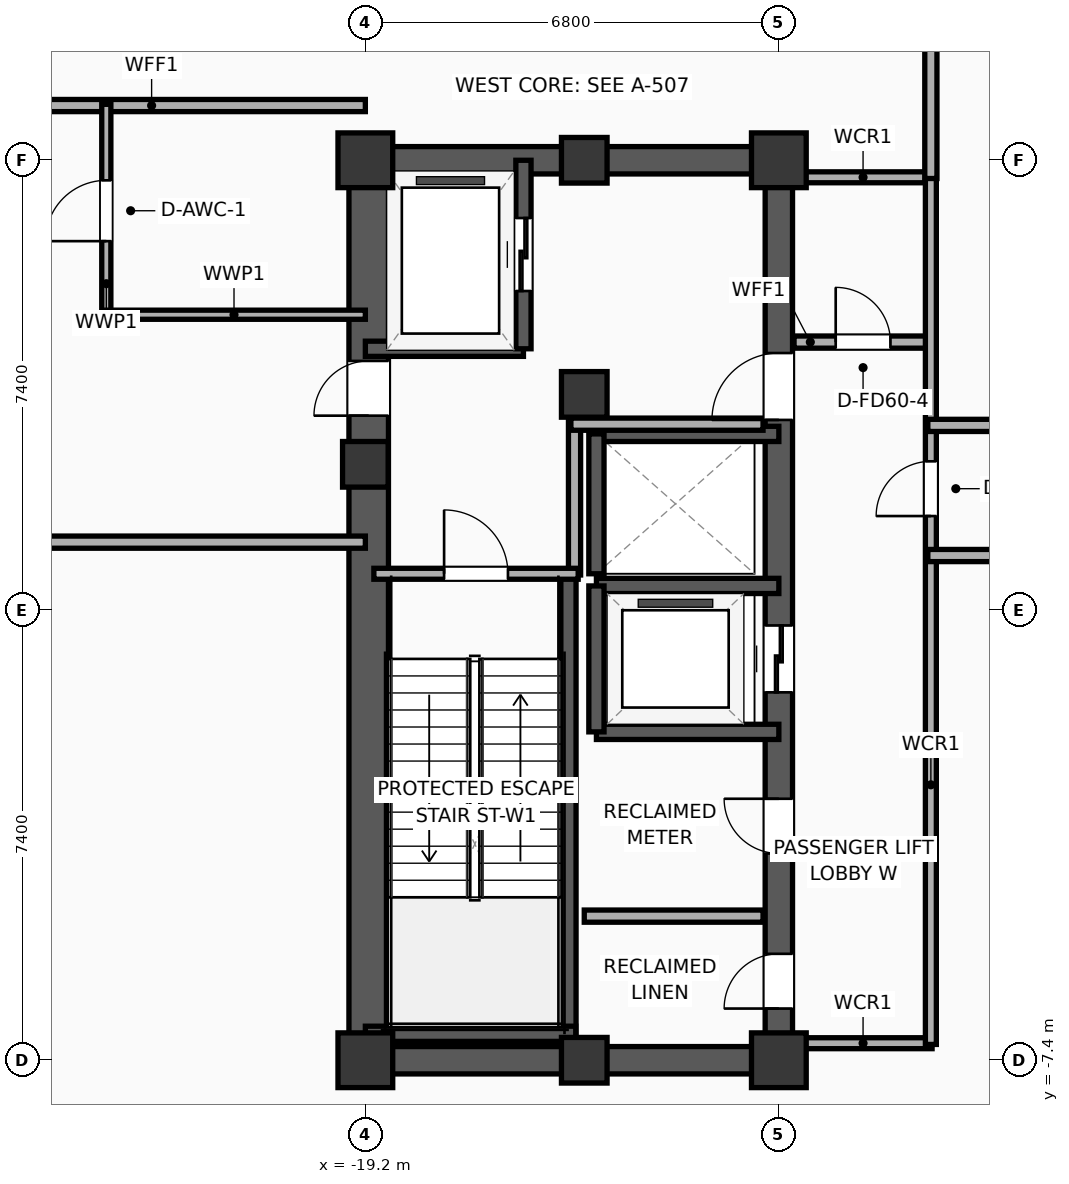
"""IFC4 building model, lengths in metres.
Left out: names, types, materials, properties, quantities, classifications, styles, units other than length and angle.
Written with IfcOpenShell. Run it as: python <this file> out.ifc"""

import sys

from ifc_helpers import new_model, si_unit, direction, frame, frame_2d, origin, origin_2d, place, context, subcontext, project, spatial, rectangle, extrude, element, fill, save


model = new_model("IFC4")
c1 = context("Model", 3, precision=1e-05, world=origin(), true_north=direction((0.0, 1.0)))
c2 = subcontext(c1, "Body", "Model", "MODEL_VIEW")
j1 = project(units=[si_unit("LENGTHUNIT", "METRE"), si_unit("PLANEANGLEUNIT", "RADIAN")], contexts=[c1])
p1 = place(None, origin())
s1 = spatial("IfcSite", under=j1, at=p1, CompositionType="ELEMENT")
p2 = place(p1, origin())
s2 = spatial("IfcBuilding", under=s1, at=p2, CompositionType="ELEMENT")
p3 = place(p2, frame((0.0, 0.0, 195.0)))
s3 = spatial("IfcBuildingStorey", under=s2, at=p3, CompositionType="ELEMENT", Elevation=195.0)
p4 = place(p3, frame((-19.2, -7.4, 0.0), z_axis=(0.0, 0.0, 1.0), x_axis=(1.0, 0.0, 0.0)))
e1 = element("IfcColumn", 1, at=p4, inside=s3, PredefinedType="COLUMN", context=c2, shape_type="SweptSolid", body=[
    extrude(rectangle(XDim=0.9, YDim=0.9, at=origin_2d()), origin(), (0.0, 0.0, 1.0), 5.2),
])
p5 = place(p3, frame((-19.2, 2.4, 0.0), z_axis=(0.0, 0.0, 1.0), x_axis=(1.0, 0.0, 0.0)))
e2 = element("IfcColumn", 2, at=p5, inside=s3, PredefinedType="COLUMN", context=c2, shape_type="SweptSolid", body=[
    extrude(rectangle(XDim=0.75, YDim=0.75, at=origin_2d()), origin(), (0.0, 0.0, 1.0), 5.2),
])
p6 = place(p3, frame((-19.2, 7.4, 0.0), z_axis=(0.0, 0.0, 1.0), x_axis=(1.0, 0.0, 0.0)))
e3 = element("IfcColumn", 3, at=p6, inside=s3, PredefinedType="COLUMN", context=c2, shape_type="SweptSolid", body=[
    extrude(rectangle(XDim=0.9, YDim=0.9, at=origin_2d()), origin(), (0.0, 0.0, 1.0), 5.2),
])
for number, where, z_axis, x_axis in (
    (4, (-15.6, -7.4, 0.0), (0.0, 0.0, 1.0), (1.0, 0.0, 0.0)),
    (5, (-15.6, 7.4, 0.0), (0.0, 0.0, 1.0), (1.0, 0.0, 0.0)),
):
    element("IfcColumn", number, at=place(p3, frame(where, z_axis=z_axis, x_axis=x_axis)), inside=s3, PredefinedType="COLUMN", context=c2, shape_type="SweptSolid", body=[
        extrude(rectangle(XDim=0.75, YDim=0.75, at=origin_2d()), origin(), (0.0, 0.0, 1.0), 5.2),
    ])
p7 = place(p3, frame((-12.4, -7.4, 0.0), z_axis=(0.0, 0.0, 1.0), x_axis=(1.0, 0.0, 0.0)))
e6 = element("IfcColumn", 6, at=p7, inside=s3, PredefinedType="COLUMN", context=c2, shape_type="SweptSolid", body=[
    extrude(rectangle(XDim=0.9, YDim=0.9, at=origin_2d()), origin(), (0.0, 0.0, 1.0), 5.2),
])
p8 = place(p3, frame((-15.6, 3.55, 0.0), z_axis=(0.0, 0.0, 1.0), x_axis=(1.0, 0.0, 0.0)))
e7 = element("IfcColumn", 7, at=p8, inside=s3, PredefinedType="COLUMN", context=c2, shape_type="SweptSolid", body=[
    extrude(rectangle(XDim=0.75, YDim=0.75, at=origin_2d()), origin(), (0.0, 0.0, 1.0), 5.2),
])
p9 = place(p3, frame((-12.4, 7.4, 0.0), z_axis=(0.0, 0.0, 1.0), x_axis=(1.0, 0.0, 0.0)))
e8 = element("IfcColumn", 8, at=p9, inside=s3, PredefinedType="COLUMN", context=c2, shape_type="SweptSolid", body=[
    extrude(rectangle(XDim=0.9, YDim=0.9, at=origin_2d()), origin(), (0.0, 0.0, 1.0), 5.2),
])
for number, where, z_axis, x_axis in (
    (9, (-19.425, -7.4, 0.0), (0.0, 0.0, 1.0), (1.0, 0.0, 0.0)),
    (10, (-19.425, 7.4, 0.0), (0.0, 0.0, 1.0), (1.0, 0.0, 0.0)),
):
    element("IfcWall", number, at=place(p3, frame(where, z_axis=z_axis, x_axis=x_axis)), inside=s3, PredefinedType="SHEAR", context=c2, shape_type="SweptSolid", body=[
        extrude(rectangle(XDim=7.25, YDim=0.45, at=frame_2d((3.625, 0.0))), origin(), (0.0, 0.0, 1.0), 4.8),
    ])
p10 = place(p3, frame((-19.145, -7.4, 0.0), z_axis=(0.0, 0.0, 1.0), x_axis=(0.0, 1.0, 0.0)))
e11 = element("IfcWall", 11, at=p10, inside=s3, PredefinedType="SHEAR", context=c2, shape_type="SweptSolid", body=[
    extrude(rectangle(XDim=14.8, YDim=0.65, at=frame_2d((7.4, 0.0))), origin(), (0.0, 0.0, 1.0), 4.8),
])
p11 = place(p10, frame((10.6, 0.0, 0.0)))
e12 = element("IfcOpeningElement", 12, at=p11, cuts=e11, PredefinedType="OPENING", context=c2, shape_type="SweptSolid", body=[
    extrude(rectangle(XDim=0.9, YDim=2.05, at=frame_2d((0.45, 1.025))), frame((0.0, 0.335, 0.0), z_axis=(0.0, -1.0, 0.0), x_axis=(1.0, 0.0, 0.0)), (0.0, 0.0, 1.0), 0.67),
])
p12 = place(p3, frame((-12.4, -7.4, 0.0), z_axis=(0.0, 0.0, 1.0), x_axis=(0.0, 1.0, 0.0)))
e13 = element("IfcWall", 13, at=p12, inside=s3, PredefinedType="SHEAR", context=c2, shape_type="SweptSolid", body=[
    extrude(rectangle(XDim=14.8, YDim=0.45, at=frame_2d((7.4, 0.0))), origin(), (0.0, 0.0, 1.0), 4.8),
])
p13 = place(p12, frame((6.05, 0.0, 0.0)))
e14 = element("IfcOpeningElement", 14, at=p13, cuts=e13, PredefinedType="OPENING", context=c2, shape_type="SweptSolid", body=[
    extrude(rectangle(XDim=1.1, YDim=2.05, at=frame_2d((0.55, 1.025))), frame((0.0, 0.235, 0.0), z_axis=(0.0, -1.0, 0.0), x_axis=(1.0, 0.0, 0.0)), (0.0, 0.0, 1.0), 0.47),
])
p14 = place(p12, frame((10.53, 0.0, 0.0)))
e15 = element("IfcOpeningElement", 15, at=p14, cuts=e13, PredefinedType="OPENING", context=c2, shape_type="SweptSolid", body=[
    extrude(rectangle(XDim=1.1, YDim=2.05, at=frame_2d((0.55, 1.025))), frame((0.0, 0.235, 0.0), z_axis=(0.0, -1.0, 0.0), x_axis=(1.0, 0.0, 0.0)), (0.0, 0.0, 1.0), 0.47),
])
p15 = place(p12, frame((0.85, 0.0, 0.0)))
e16 = element("IfcOpeningElement", 16, at=p15, cuts=e13, PredefinedType="OPENING", context=c2, shape_type="SweptSolid", body=[
    extrude(rectangle(XDim=0.9, YDim=2.05, at=frame_2d((0.45, 1.025))), frame((0.0, 0.235, 0.0), z_axis=(0.0, -1.0, 0.0), x_axis=(1.0, 0.0, 0.0)), (0.0, 0.0, 1.0), 0.47),
])
p16 = place(p12, frame((3.4, 0.0, 0.0)))
e17 = element("IfcOpeningElement", 17, at=p16, cuts=e13, PredefinedType="OPENING", context=c2, shape_type="SweptSolid", body=[
    extrude(rectangle(XDim=0.9, YDim=2.05, at=frame_2d((0.45, 1.025))), frame((0.0, 0.235, 0.0), z_axis=(0.0, -1.0, 0.0), x_axis=(1.0, 0.0, 0.0)), (0.0, 0.0, 1.0), 0.47),
])
p17 = place(p3, frame((-15.86, -7.085, 0.0), z_axis=(0.0, 0.0, 1.0), x_axis=(0.0, 1.0, 0.0)))
e18 = element("IfcWall", 18, at=p17, inside=s3, PredefinedType="SOLIDWALL", context=c2, shape_type="SweptSolid", body=[
    extrude(rectangle(XDim=7.685, YDim=0.25, at=frame_2d((3.843, 0.0))), origin(), (0.0, 0.0, 1.0), 4.8),
])
p18 = place(p3, frame((-19.2, -6.965, 0.0), z_axis=(0.0, 0.0, 1.0), x_axis=(1.0, 0.0, 0.0)))
e19 = element("IfcWall", 19, at=p18, inside=s3, PredefinedType="SOLIDWALL", context=c2, shape_type="SweptSolid", body=[
    extrude(rectangle(XDim=3.46, YDim=0.25, at=frame_2d((1.73, 0.0))), origin(), (0.0, 0.0, 1.0), 4.8),
])
p19 = place(p3, frame((-19.2, 4.3, 0.0), z_axis=(0.0, 0.0, 1.0), x_axis=(1.0, 0.0, 0.0)))
e20 = element("IfcWall", 20, at=p19, inside=s3, PredefinedType="SOLIDWALL", context=c2, shape_type="SweptSolid", body=[
    extrude(rectangle(XDim=2.6, YDim=0.25, at=frame_2d((1.3, 0.0))), origin(), (0.0, 0.0, 1.0), 4.8),
])
p20 = place(p3, frame((-16.6, 4.3, 0.0), z_axis=(0.0, 0.0, 1.0), x_axis=(0.0, 1.0, 0.0)))
e21 = element("IfcWall", 21, at=p20, inside=s3, PredefinedType="SOLIDWALL", context=c2, shape_type="SweptSolid", body=[
    extrude(rectangle(XDim=3.1, YDim=0.25, at=frame_2d((1.55, 0.0))), origin(), (0.0, 0.0, 1.0), 4.8),
])
p21 = place(p20, frame((0.95, 0.0, 0.0)))
e22 = element("IfcOpeningElement", 22, at=p21, cuts=e21, PredefinedType="OPENING", context=c2, shape_type="SweptSolid", body=[
    extrude(rectangle(XDim=1.2, YDim=2.05, at=frame_2d((0.6, 1.025))), frame((0.0, 0.135, 0.0), z_axis=(0.0, -1.0, 0.0), x_axis=(1.0, 0.0, 0.0)), (0.0, 0.0, 1.0), 0.27),
])
for number, where, z_axis, x_axis in (
    (23, (-15.4, -2.0, 0.0), (0.0, 0.0, 1.0), (1.0, 0.0, 0.0)),
    (24, (-12.4, 0.4, 0.0), (0.0, 0.0, 1.0), (-1.0, 0.0, 0.0)),
):
    element("IfcWall", number, at=place(p3, frame(where, z_axis=z_axis, x_axis=x_axis)), inside=s3, PredefinedType="SOLIDWALL", context=c2, shape_type="SweptSolid", body=[
        extrude(rectangle(XDim=3.0, YDim=0.25, at=frame_2d((1.5, 0.0))), origin(), (0.0, 0.0, 1.0), 4.8),
    ])
p22 = place(p3, frame((-15.4, 0.4, 0.0), z_axis=(0.0, 0.0, 1.0), x_axis=(0.0, -1.0, 0.0)))
e25 = element("IfcWall", 25, at=p22, inside=s3, PredefinedType="SOLIDWALL", context=c2, shape_type="SweptSolid", body=[
    extrude(rectangle(XDim=2.4, YDim=0.25, at=frame_2d((1.2, 0.0))), origin(), (0.0, 0.0, 1.0), 4.8),
])
p23 = place(p3, frame((-12.4, 2.9, 0.0), z_axis=(0.0, 0.0, 1.0), x_axis=(-1.0, 0.0, 0.0)))
e26 = element("IfcWall", 26, at=p23, inside=s3, PredefinedType="SOLIDWALL", context=c2, shape_type="SweptSolid", body=[
    extrude(rectangle(XDim=3.0, YDim=0.25, at=frame_2d((1.5, 0.0))), origin(), (0.0, 0.0, 1.0), 4.8),
])
p24 = place(p3, frame((-15.4, 2.9, 0.0), z_axis=(0.0, 0.0, 1.0), x_axis=(0.0, -1.0, 0.0)))
e27 = element("IfcWall", 27, at=p24, inside=s3, PredefinedType="SOLIDWALL", context=c2, shape_type="SweptSolid", body=[
    extrude(rectangle(XDim=2.3, YDim=0.25, at=frame_2d((1.15, 0.0))), origin(), (0.0, 0.0, 1.0), 4.8),
])
p25 = place(p3, frame((-15.76, 0.58, 0.0), z_axis=(0.0, 0.0, 1.0), x_axis=(0.0, 1.0, 0.0)))
e28 = element("IfcWall", 28, at=p25, inside=s3, PredefinedType="PARTITIONING", context=c2, shape_type="SweptSolid", body=[
    extrude(rectangle(XDim=2.52, YDim=0.2, at=frame_2d((1.26, 0.0))), origin(), (0.0, 0.0, 1.0), 4.8),
])
p26 = place(p3, frame((-15.82, 3.06, 0.0), z_axis=(0.0, 0.0, 1.0), x_axis=(1.0, 0.0, 0.0)))
e29 = element("IfcWall", 29, at=p26, inside=s3, PredefinedType="PARTITIONING", context=c2, shape_type="SweptSolid", body=[
    extrude(rectangle(XDim=3.16, YDim=0.2, at=frame_2d((1.58, 0.0))), origin(), (0.0, 0.0, 1.0), 4.8),
])
p27 = place(p3, frame((-19.06, 0.6, 0.0), z_axis=(0.0, 0.0, 1.0), x_axis=(1.0, 0.0, 0.0)))
e30 = element("IfcWall", 30, at=p27, inside=s3, PredefinedType="PARTITIONING", context=c2, shape_type="SweptSolid", body=[
    extrude(rectangle(XDim=3.36, YDim=0.18, at=frame_2d((1.68, 0.0))), origin(), (0.0, 0.0, 1.0), 4.8),
])
p28 = place(p27, frame((1.155, 0.0, 0.0)))
e31 = element("IfcOpeningElement", 31, at=p28, cuts=e30, PredefinedType="OPENING", context=c2, shape_type="SweptSolid", body=[
    extrude(rectangle(XDim=1.05, YDim=2.05, at=frame_2d((0.525, 1.025))), frame((0.0, 0.1, 0.0), z_axis=(0.0, -1.0, 0.0), x_axis=(1.0, 0.0, 0.0)), (0.0, 0.0, 1.0), 0.2),
])
p29 = place(p3, frame((-15.6, -5.03, 0.0), z_axis=(0.0, 0.0, 1.0), x_axis=(1.0, 0.0, 0.0)))
e32 = element("IfcWall", 32, at=p29, inside=s3, PredefinedType="PARTITIONING", context=c2, shape_type="SweptSolid", body=[
    extrude(rectangle(XDim=2.94, YDim=0.2, at=frame_2d((1.47, 0.0))), origin(), (0.0, 0.0, 1.0), 4.8),
])
p30 = place(p3, frame((-12.15, 4.41, 0.0), z_axis=(0.0, 0.0, 1.0), x_axis=(1.0, 0.0, 0.0)))
e33 = element("IfcWall", 33, at=p30, inside=s3, PredefinedType="PARTITIONING", context=c2, shape_type="SweptSolid", body=[
    extrude(rectangle(XDim=2.27, YDim=0.2, at=frame_2d((1.135, 0.0))), origin(), (0.0, 0.0, 1.0), 4.8),
])
p31 = place(p30, frame((0.685, 0.0, 0.0)))
e34 = element("IfcOpeningElement", 34, at=p31, cuts=e33, PredefinedType="OPENING", context=c2, shape_type="SweptSolid", body=[
    extrude(rectangle(XDim=0.9, YDim=2.05, at=frame_2d((0.45, 1.025))), frame((0.0, 0.11, 0.0), z_axis=(0.0, -1.0, 0.0), x_axis=(1.0, 0.0, 0.0)), (0.0, 0.0, 1.0), 0.22),
])
for number, where, z_axis, x_axis in (
    (35, (-12.15, 7.12, 0.0), (0.0, 0.0, 1.0), (1.0, 0.0, 0.0)),
    (36, (-12.15, -7.12, 0.0), (0.0, 0.0, 1.0), (1.0, 0.0, 0.0)),
):
    element("IfcWall", number, at=place(p3, frame(where, z_axis=z_axis, x_axis=x_axis)), inside=s3, PredefinedType="PARTITIONING", context=c2, shape_type="SweptSolid", body=[
        extrude(rectangle(XDim=2.27, YDim=0.18, at=frame_2d((1.135, 0.0))), origin(), (0.0, 0.0, 1.0), 3.84),
    ])
p32 = place(p3, frame((-9.9, -7.14, 0.0), z_axis=(0.0, 0.0, 1.0), x_axis=(0.0, 1.0, 0.0)))
e37 = element("IfcWall", 37, at=p32, inside=s3, PredefinedType="PARTITIONING", context=c2, shape_type="SweptSolid", body=[
    extrude(rectangle(XDim=14.28, YDim=0.18, at=frame_2d((7.14, 0.0))), origin(), (0.0, 0.0, 1.0), 4.8),
])
p33 = place(p32, frame((8.689, 0.0, 0.0)))
e38 = element("IfcOpeningElement", 38, at=p33, cuts=e37, PredefinedType="OPENING", context=c2, shape_type="SweptSolid", body=[
    extrude(rectangle(XDim=0.9, YDim=2.05, at=frame_2d((0.45, 1.025))), frame((0.0, 0.1, 0.0), z_axis=(0.0, -1.0, 0.0), x_axis=(1.0, 0.0, 0.0)), (0.0, 0.0, 1.0), 0.2),
])
p34 = place(p3, frame((-9.95, 3.04, 0.0), z_axis=(0.0, 0.0, 1.0), x_axis=(1.0, 0.0, 0.0)))
e39 = element("IfcWall", 39, at=p34, inside=s3, PredefinedType="PARTITIONING", context=c2, shape_type="SweptSolid", body=[
    extrude(rectangle(XDim=19.9, YDim=0.2, at=frame_2d((9.95, 0.0))), origin(), (0.0, 0.0, 1.0), 4.8),
])
p35 = place(p34, frame((9.425, 0.0, 0.0)))
e40 = element("IfcOpeningElement", 40, at=p35, cuts=e39, PredefinedType="OPENING", context=c2, shape_type="SweptSolid", body=[
    extrude(rectangle(XDim=1.05, YDim=2.05, at=frame_2d((0.525, 1.025))), frame((0.0, 0.11, 0.0), z_axis=(0.0, -1.0, 0.0), x_axis=(1.0, 0.0, 0.0)), (0.0, 0.0, 1.0), 0.22),
])
p36 = place(p3, frame((-9.95, 0.9, 0.0), z_axis=(0.0, 0.0, 1.0), x_axis=(1.0, 0.0, 0.0)))
e41 = element("IfcWall", 41, at=p36, inside=s3, PredefinedType="PARTITIONING", context=c2, shape_type="SweptSolid", body=[
    extrude(rectangle(XDim=19.9, YDim=0.2, at=frame_2d((9.95, 0.0))), origin(), (0.0, 0.0, 1.0), 4.8),
])
p37 = place(p36, frame((9.425, 0.0, 0.0)))
e42 = element("IfcOpeningElement", 42, at=p37, cuts=e41, PredefinedType="OPENING", context=c2, shape_type="SweptSolid", body=[
    extrude(rectangle(XDim=1.05, YDim=2.05, at=frame_2d((0.525, 1.025))), frame((0.0, 0.11, 0.0), z_axis=(0.0, -1.0, 0.0), x_axis=(1.0, 0.0, 0.0)), (0.0, 0.0, 1.0), 0.22),
])
for number, where, z_axis, x_axis in (
    (43, (-26.23, 1.12, 0.0), (0.0, 0.0, 1.0), (1.0, 0.0, 0.0)),
    (44, (-26.23, 8.3, 0.0), (0.0, 0.0, 1.0), (1.0, 0.0, 0.0)),
):
    element("IfcWall", number, at=place(p3, frame(where, z_axis=z_axis, x_axis=x_axis)), inside=s3, PredefinedType="PARTITIONING", context=c2, shape_type="SweptSolid", body=[
        extrude(rectangle(XDim=7.03, YDim=0.2, at=frame_2d((3.515, 0.0))), origin(), (0.0, 0.0, 1.0), 4.8),
    ])
p38 = place(p3, frame((-23.46, 4.82, 0.0), z_axis=(0.0, 0.0, 1.0), x_axis=(0.0, 1.0, 0.0)))
e45 = element("IfcWall", 45, at=p38, inside=s3, PredefinedType="PLUMBINGWALL", context=c2, shape_type="SweptSolid", body=[
    extrude(rectangle(XDim=3.5, YDim=0.15, at=frame_2d((1.75, 0.0))), origin(), (0.0, 0.0, 1.0), 4.8),
])
p39 = place(p38, frame((1.25, 0.0, 0.0)))
e46 = element("IfcOpeningElement", 46, at=p39, cuts=e45, PredefinedType="OPENING", context=c2, shape_type="SweptSolid", body=[
    extrude(rectangle(XDim=1.0, YDim=2.05, at=frame_2d((0.5, 1.025))), frame((0.0, 0.085, 0.0), z_axis=(0.0, -1.0, 0.0), x_axis=(1.0, 0.0, 0.0)), (0.0, 0.0, 1.0), 0.17),
])
p40 = place(p3, frame((-23.52, 4.86, 0.0), z_axis=(0.0, 0.0, 1.0), x_axis=(1.0, 0.0, 0.0)))
e47 = element("IfcWall", 47, at=p40, inside=s3, PredefinedType="PLUMBINGWALL", context=c2, shape_type="SweptSolid", body=[
    extrude(rectangle(XDim=4.32, YDim=0.15, at=frame_2d((2.16, 0.0))), origin(), (0.0, 0.0, 1.0), 4.8),
])
p41 = place(p3, frame((-9.9, 7.1, 0.0), z_axis=(0.0, 0.0, 1.0), x_axis=(0.0, 1.0, 0.0)))
e48 = element("IfcWall", 48, at=p41, inside=s3, PredefinedType="PARTITIONING", context=c2, shape_type="SweptSolid", body=[
    extrude(rectangle(XDim=12.93, YDim=0.2, at=frame_2d((6.465, 0.0))), origin(), (0.0, 0.0, 1.0), 4.8),
])
p42 = place(p41, frame((6.974, 0.0, 0.0)))
e49 = element("IfcOpeningElement", 49, at=p42, cuts=e48, PredefinedType="OPENING", context=c2, shape_type="SweptSolid", body=[
    extrude(rectangle(XDim=1.05, YDim=2.05, at=frame_2d((0.525, 1.025))), frame((0.0, 0.11, 0.0), z_axis=(0.0, -1.0, 0.0), x_axis=(1.0, 0.0, 0.0)), (0.0, 0.0, 1.0), 0.22),
])
p43 = place(p21, origin())
e50 = element("IfcDoor", 50, at=p43, inside=s3, OperationType="SLIDING_TO_LEFT", PredefinedType="DOOR", context=c2, shape_type="SweptSolid", body=[
    extrude(rectangle(XDim=1.2, YDim=2.05, at=frame_2d((0.6, 1.025))), frame((0.0, 0.025, 0.0), z_axis=(0.0, -1.0, 0.0), x_axis=(1.0, 0.0, 0.0)), (0.0, 0.0, 1.0), 0.05),
])
fill(e22, e50)
p44 = place(p13, origin())
e51 = element("IfcDoor", 51, at=p44, inside=s3, OperationType="SLIDING_TO_LEFT", PredefinedType="DOOR", context=c2, shape_type="SweptSolid", body=[
    extrude(rectangle(XDim=1.1, YDim=2.05, at=frame_2d((0.55, 1.025))), frame((0.0, 0.025, 0.0), z_axis=(0.0, -1.0, 0.0), x_axis=(1.0, 0.0, 0.0)), (0.0, 0.0, 1.0), 0.05),
])
fill(e14, e51)
p45 = place(p28, origin())
e52 = element("IfcDoor", 52, at=p45, inside=s3, OperationType="SINGLE_SWING_LEFT", PredefinedType="DOOR", context=c2, shape_type="SweptSolid", body=[
    extrude(rectangle(XDim=1.05, YDim=2.05, at=frame_2d((0.525, 1.025))), frame((0.0, 0.025, 0.0), z_axis=(0.0, -1.0, 0.0), x_axis=(1.0, 0.0, 0.0)), (0.0, 0.0, 1.0), 0.05),
])
fill(e31, e52)
p46 = place(p31, origin())
e53 = element("IfcDoor", 53, at=p46, inside=s3, OperationType="SINGLE_SWING_LEFT", PredefinedType="DOOR", context=c2, shape_type="SweptSolid", body=[
    extrude(rectangle(XDim=0.9, YDim=2.05, at=frame_2d((0.45, 1.025))), frame((0.0, 0.025, 0.0), z_axis=(0.0, -1.0, 0.0), x_axis=(1.0, 0.0, 0.0)), (0.0, 0.0, 1.0), 0.05),
])
fill(e34, e53)
p47 = place(p33, origin())
e54 = element("IfcDoor", 54, at=p47, inside=s3, OperationType="SINGLE_SWING_LEFT", PredefinedType="DOOR", context=c2, shape_type="SweptSolid", body=[
    extrude(rectangle(XDim=0.9, YDim=2.05, at=frame_2d((0.45, 1.025))), frame((0.0, 0.025, 0.0), z_axis=(0.0, -1.0, 0.0), x_axis=(1.0, 0.0, 0.0)), (0.0, 0.0, 1.0), 0.05),
])
fill(e38, e54)
p48 = place(p39, origin())
e55 = element("IfcDoor", 55, at=p48, inside=s3, OperationType="SINGLE_SWING_LEFT", PredefinedType="DOOR", context=c2, shape_type="SweptSolid", body=[
    extrude(rectangle(XDim=1.0, YDim=2.05, at=frame_2d((0.5, 1.025))), frame((0.0, 0.025, 0.0), z_axis=(0.0, -1.0, 0.0), x_axis=(1.0, 0.0, 0.0)), (0.0, 0.0, 1.0), 0.05),
])
fill(e46, e55)
p49 = place(p14, origin())
e56 = element("IfcDoor", 56, at=p49, inside=s3, OperationType="SINGLE_SWING_LEFT", PredefinedType="DOOR", context=c2, shape_type="SweptSolid", body=[
    extrude(rectangle(XDim=1.1, YDim=2.05, at=frame_2d((0.55, 1.025))), frame((0.0, 0.025, 0.0), z_axis=(0.0, -1.0, 0.0), x_axis=(1.0, 0.0, 0.0)), (0.0, 0.0, 1.0), 0.05),
])
fill(e15, e56)
p50 = place(p11, origin())
e57 = element("IfcDoor", 57, at=p50, inside=s3, OperationType="SINGLE_SWING_LEFT", PredefinedType="DOOR", context=c2, shape_type="SweptSolid", body=[
    extrude(rectangle(XDim=0.9, YDim=2.05, at=frame_2d((0.45, 1.025))), frame((0.0, 0.025, 0.0), z_axis=(0.0, -1.0, 0.0), x_axis=(1.0, 0.0, 0.0)), (0.0, 0.0, 1.0), 0.05),
])
fill(e12, e57)
p51 = place(p15, origin())
e58 = element("IfcDoor", 58, at=p51, inside=s3, OperationType="SINGLE_SWING_LEFT", PredefinedType="DOOR", context=c2, shape_type="SweptSolid", body=[
    extrude(rectangle(XDim=0.9, YDim=2.05, at=frame_2d((0.45, 1.025))), frame((0.0, 0.025, 0.0), z_axis=(0.0, -1.0, 0.0), x_axis=(1.0, 0.0, 0.0)), (0.0, 0.0, 1.0), 0.05),
])
fill(e16, e58)
p52 = place(p16, origin())
e59 = element("IfcDoor", 59, at=p52, inside=s3, OperationType="SINGLE_SWING_RIGHT", PredefinedType="DOOR", context=c2, shape_type="SweptSolid", body=[
    extrude(rectangle(XDim=0.9, YDim=2.05, at=frame_2d((0.45, 1.025))), frame((0.0, 0.025, 0.0), z_axis=(0.0, -1.0, 0.0), x_axis=(1.0, 0.0, 0.0)), (0.0, 0.0, 1.0), 0.05),
])
fill(e17, e59)
save(model, sys.argv[1])
